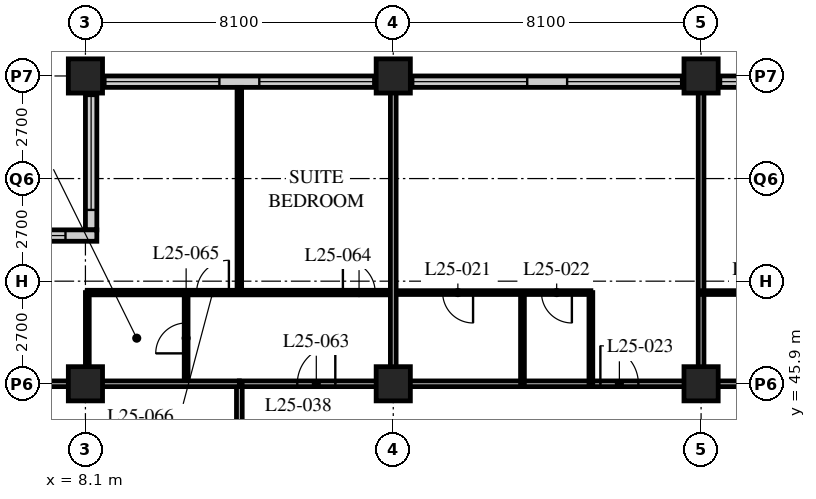
"""IFC4 building model, lengths in metres.
Left out: names, types, materials, properties, quantities, classifications, styles, units other than length and angle.
Written with IfcOpenShell. Run it as: python <this file> out.ifc"""

import sys

from ifc_helpers import new_model, si_unit, direction, frame, frame_2d, origin, origin_2d, place, context, subcontext, project, spatial, rectangle, hollow_rectangle, extrude, element, fill, save


model = new_model("IFC4")
c1 = context("Model", 3, precision=1e-05, world=origin(), true_north=direction((0.0, 1.0)))
c2 = subcontext(c1, "Body", "Model", "MODEL_VIEW")
j1 = project(units=[si_unit("LENGTHUNIT", "METRE"), si_unit("PLANEANGLEUNIT", "RADIAN")], contexts=[c1])
p1 = place(None, origin())
s1 = spatial("IfcSite", under=j1, at=p1, CompositionType="ELEMENT")
p2 = place(p1, origin())
s2 = spatial("IfcBuilding", under=s1, at=p2, CompositionType="ELEMENT")
p3 = place(p2, frame((0.0, 0.0, 103.4)))
s3 = spatial("IfcBuildingStorey", under=s2, at=p3, CompositionType="ELEMENT", Elevation=103.4)
p4 = place(p3, frame((8.1, 45.9, 0.0), z_axis=(0.0, 0.0, 1.0), x_axis=(1.0, 0.0, 0.0)))
e1 = element("IfcColumn", 1, at=p4, inside=s3, PredefinedType="COLUMN", context=c2, shape_type="SweptSolid", body=[
    extrude(hollow_rectangle(XDim=0.9, YDim=0.9, WallThickness=0.1, at=origin_2d()), origin(), (0.0, 0.0, 1.0), 3.4),
])
p5 = place(p3, frame((8.1, 54.0, 0.0), z_axis=(0.0, 0.0, 1.0), x_axis=(1.0, 0.0, 0.0)))
e2 = element("IfcColumn", 2, at=p5, inside=s3, PredefinedType="COLUMN", context=c2, shape_type="SweptSolid", body=[
    extrude(hollow_rectangle(XDim=0.9, YDim=0.9, WallThickness=0.09, at=origin_2d()), origin(), (0.0, 0.0, 1.0), 3.4),
])
p6 = place(p3, frame((16.2, 45.9, 0.0), z_axis=(0.0, 0.0, 1.0), x_axis=(1.0, 0.0, 0.0)))
e3 = element("IfcColumn", 3, at=p6, inside=s3, PredefinedType="COLUMN", context=c2, shape_type="SweptSolid", body=[
    extrude(hollow_rectangle(XDim=0.9, YDim=0.9, WallThickness=0.1, at=origin_2d()), origin(), (0.0, 0.0, 1.0), 3.4),
])
p7 = place(p3, frame((16.2, 54.0, 0.0), z_axis=(0.0, 0.0, 1.0), x_axis=(1.0, 0.0, 0.0)))
e4 = element("IfcColumn", 4, at=p7, inside=s3, PredefinedType="COLUMN", context=c2, shape_type="SweptSolid", body=[
    extrude(hollow_rectangle(XDim=0.9, YDim=0.9, WallThickness=0.09, at=origin_2d()), origin(), (0.0, 0.0, 1.0), 3.4),
])
p8 = place(p3, frame((24.3, 45.9, 0.0), z_axis=(0.0, 0.0, 1.0), x_axis=(1.0, 0.0, 0.0)))
e5 = element("IfcColumn", 5, at=p8, inside=s3, PredefinedType="COLUMN", context=c2, shape_type="SweptSolid", body=[
    extrude(hollow_rectangle(XDim=0.9, YDim=0.9, WallThickness=0.1, at=origin_2d()), origin(), (0.0, 0.0, 1.0), 3.4),
])
p9 = place(p3, frame((24.3, 54.0, 0.0), z_axis=(0.0, 0.0, 1.0), x_axis=(1.0, 0.0, 0.0)))
e6 = element("IfcColumn", 6, at=p9, inside=s3, PredefinedType="COLUMN", context=c2, shape_type="SweptSolid", body=[
    extrude(hollow_rectangle(XDim=0.9, YDim=0.9, WallThickness=0.09, at=origin_2d()), origin(), (0.0, 0.0, 1.0), 3.4),
])
p10 = place(p3, frame((48.3, 53.85, 0.0), z_axis=(0.0, 0.0, 1.0), x_axis=(-1.0, 0.0, 0.0)))
e7 = element("IfcWall", 7, at=p10, inside=s3, PredefinedType="SOLIDWALL", context=c2, shape_type="SweptSolid", body=[
    extrude(rectangle(XDim=40.2, YDim=0.3, at=frame_2d((20.1, 0.0))), origin(), (0.0, 0.0, 1.0), 3.19),
])
p11 = place(p10, frame((0.225, 0.0, 0.9)))
e8 = element("IfcOpeningElement", 8, at=p11, cuts=e7, PredefinedType="OPENING", context=c2, shape_type="SweptSolid", body=[
    extrude(rectangle(XDim=3.0, YDim=2.0, at=frame_2d((1.5, 1.0))), frame((0.0, 0.16, 0.0), z_axis=(0.0, -1.0, 0.0), x_axis=(1.0, 0.0, 0.0)), (0.0, 0.0, 1.0), 0.32),
])
p12 = place(p10, frame((4.275, 0.0, 0.9)))
e9 = element("IfcOpeningElement", 9, at=p12, cuts=e7, PredefinedType="OPENING", context=c2, shape_type="SweptSolid", body=[
    extrude(rectangle(XDim=3.0, YDim=2.0, at=frame_2d((1.5, 1.0))), frame((0.0, 0.16, 0.0), z_axis=(0.0, -1.0, 0.0), x_axis=(1.0, 0.0, 0.0)), (0.0, 0.0, 1.0), 0.32),
])
p13 = place(p10, frame((8.325, 0.0, 0.9)))
e10 = element("IfcOpeningElement", 10, at=p13, cuts=e7, PredefinedType="OPENING", context=c2, shape_type="SweptSolid", body=[
    extrude(rectangle(XDim=3.0, YDim=2.0, at=frame_2d((1.5, 1.0))), frame((0.0, 0.16, 0.0), z_axis=(0.0, -1.0, 0.0), x_axis=(1.0, 0.0, 0.0)), (0.0, 0.0, 1.0), 0.32),
])
p14 = place(p10, frame((12.375, 0.0, 0.9)))
e11 = element("IfcOpeningElement", 11, at=p14, cuts=e7, PredefinedType="OPENING", context=c2, shape_type="SweptSolid", body=[
    extrude(rectangle(XDim=3.0, YDim=2.0, at=frame_2d((1.5, 1.0))), frame((0.0, 0.16, 0.0), z_axis=(0.0, -1.0, 0.0), x_axis=(1.0, 0.0, 0.0)), (0.0, 0.0, 1.0), 0.32),
])
p15 = place(p10, frame((16.425, 0.0, 0.9)))
e12 = element("IfcOpeningElement", 12, at=p15, cuts=e7, PredefinedType="OPENING", context=c2, shape_type="SweptSolid", body=[
    extrude(rectangle(XDim=3.0, YDim=2.0, at=frame_2d((1.5, 1.0))), frame((0.0, 0.16, 0.0), z_axis=(0.0, -1.0, 0.0), x_axis=(1.0, 0.0, 0.0)), (0.0, 0.0, 1.0), 0.32),
])
p16 = place(p10, frame((20.475, 0.0, 0.9)))
e13 = element("IfcOpeningElement", 13, at=p16, cuts=e7, PredefinedType="OPENING", context=c2, shape_type="SweptSolid", body=[
    extrude(rectangle(XDim=3.0, YDim=2.0, at=frame_2d((1.5, 1.0))), frame((0.0, 0.16, 0.0), z_axis=(0.0, -1.0, 0.0), x_axis=(1.0, 0.0, 0.0)), (0.0, 0.0, 1.0), 0.32),
])
p17 = place(p10, frame((24.525, 0.0, 0.9)))
e14 = element("IfcOpeningElement", 14, at=p17, cuts=e7, PredefinedType="OPENING", context=c2, shape_type="SweptSolid", body=[
    extrude(rectangle(XDim=3.0, YDim=2.0, at=frame_2d((1.5, 1.0))), frame((0.0, 0.16, 0.0), z_axis=(0.0, -1.0, 0.0), x_axis=(1.0, 0.0, 0.0)), (0.0, 0.0, 1.0), 0.32),
])
p18 = place(p10, frame((28.575, 0.0, 0.9)))
e15 = element("IfcOpeningElement", 15, at=p18, cuts=e7, PredefinedType="OPENING", context=c2, shape_type="SweptSolid", body=[
    extrude(rectangle(XDim=3.0, YDim=2.0, at=frame_2d((1.5, 1.0))), frame((0.0, 0.16, 0.0), z_axis=(0.0, -1.0, 0.0), x_axis=(1.0, 0.0, 0.0)), (0.0, 0.0, 1.0), 0.32),
])
p19 = place(p10, frame((32.625, 0.0, 0.9)))
e16 = element("IfcOpeningElement", 16, at=p19, cuts=e7, PredefinedType="OPENING", context=c2, shape_type="SweptSolid", body=[
    extrude(rectangle(XDim=3.0, YDim=2.0, at=frame_2d((1.5, 1.0))), frame((0.0, 0.16, 0.0), z_axis=(0.0, -1.0, 0.0), x_axis=(1.0, 0.0, 0.0)), (0.0, 0.0, 1.0), 0.32),
])
p20 = place(p10, frame((36.675, 0.0, 0.9)))
e17 = element("IfcOpeningElement", 17, at=p20, cuts=e7, PredefinedType="OPENING", context=c2, shape_type="SweptSolid", body=[
    extrude(rectangle(XDim=3.0, YDim=2.0, at=frame_2d((1.5, 1.0))), frame((0.0, 0.16, 0.0), z_axis=(0.0, -1.0, 0.0), x_axis=(1.0, 0.0, 0.0)), (0.0, 0.0, 1.0), 0.32),
])
p21 = place(p3, frame((8.25, 53.7, 0.0), z_axis=(0.0, 0.0, 1.0), x_axis=(0.0, -1.0, 0.0)))
e18 = element("IfcWall", 18, at=p21, inside=s3, PredefinedType="SOLIDWALL", context=c2, shape_type="SweptSolid", body=[
    extrude(rectangle(XDim=3.75, YDim=0.3, at=frame_2d((1.875, 0.0))), origin(), (0.0, 0.0, 1.0), 2.64),
])
p22 = place(p21, frame((0.225, 0.0, 0.9)))
e19 = element("IfcOpeningElement", 19, at=p22, cuts=e18, PredefinedType="OPENING", context=c2, shape_type="SweptSolid", body=[
    extrude(rectangle(XDim=3.0, YDim=1.5, at=frame_2d((1.5, 0.75))), frame((0.0, 0.16, 0.0), z_axis=(0.0, -1.0, 0.0), x_axis=(1.0, 0.0, 0.0)), (0.0, 0.0, 1.0), 0.32),
])
p23 = place(p3, frame((8.4, 49.8, 0.0), z_axis=(0.0, 0.0, 1.0), x_axis=(-1.0, 0.0, 0.0)))
e20 = element("IfcWall", 20, at=p23, inside=s3, PredefinedType="SOLIDWALL", context=c2, shape_type="SweptSolid", body=[
    extrude(rectangle(XDim=4.35, YDim=0.3, at=frame_2d((2.175, 0.0))), origin(), (0.0, 0.0, 1.0), 3.19),
])
p24 = place(p23, frame((0.825, 0.0, 0.9)))
e21 = element("IfcOpeningElement", 21, at=p24, cuts=e20, PredefinedType="OPENING", context=c2, shape_type="SweptSolid", body=[
    extrude(rectangle(XDim=3.0, YDim=1.5, at=frame_2d((1.5, 0.75))), frame((0.0, 0.16, 0.0), z_axis=(0.0, -1.0, 0.0), x_axis=(1.0, 0.0, 0.0)), (0.0, 0.0, 1.0), 0.32),
])
p25 = place(p3, frame((12.15, 45.9, 0.0), z_axis=(0.0, 0.0, 1.0), x_axis=(1.0, 0.0, 0.0)))
e22 = element("IfcWall", 22, at=p25, inside=s3, PredefinedType="PARTITIONING", context=c2, shape_type="SweptSolid", body=[
    extrude(rectangle(XDim=32.4, YDim=0.15, at=frame_2d((16.2, 0.0))), origin(), (0.0, 0.0, 1.0), 2.578),
])
p26 = place(p25, frame((9.5, 0.0, 0.0)))
e23 = element("IfcOpeningElement", 23, at=p26, cuts=e22, PredefinedType="OPENING", context=c2, shape_type="SweptSolid", body=[
    extrude(rectangle(XDim=1.0, YDim=2.1, at=frame_2d((0.5, 1.05))), frame((0.0, 0.085, 0.0), z_axis=(0.0, -1.0, 0.0), x_axis=(1.0, 0.0, 0.0)), (0.0, 0.0, 1.0), 0.17),
])
p27 = place(p25, frame((17.6, 0.0, 0.0)))
e24 = element("IfcOpeningElement", 24, at=p27, cuts=e22, PredefinedType="OPENING", context=c2, shape_type="SweptSolid", body=[
    extrude(rectangle(XDim=1.0, YDim=2.1, at=frame_2d((0.5, 1.05))), frame((0.0, 0.085, 0.0), z_axis=(0.0, -1.0, 0.0), x_axis=(1.0, 0.0, 0.0)), (0.0, 0.0, 1.0), 0.17),
])
p28 = place(p25, frame((25.7, 0.0, 0.0)))
e25 = element("IfcOpeningElement", 25, at=p28, cuts=e22, PredefinedType="OPENING", context=c2, shape_type="SweptSolid", body=[
    extrude(rectangle(XDim=1.0, YDim=2.1, at=frame_2d((0.5, 1.05))), frame((0.0, 0.085, 0.0), z_axis=(0.0, -1.0, 0.0), x_axis=(1.0, 0.0, 0.0)), (0.0, 0.0, 1.0), 0.17),
])
p29 = place(p25, frame((29.875, 0.0, 0.0)))
e26 = element("IfcOpeningElement", 26, at=p29, cuts=e22, PredefinedType="OPENING", context=c2, shape_type="SweptSolid", body=[
    extrude(rectangle(XDim=1.0, YDim=2.1, at=frame_2d((0.5, 1.05))), frame((0.0, 0.085, 0.0), z_axis=(0.0, -1.0, 0.0), x_axis=(1.0, 0.0, 0.0)), (0.0, 0.0, 1.0), 0.17),
])
p30 = place(p25, frame((1.525, 0.0, 0.0)))
e27 = element("IfcOpeningElement", 27, at=p30, cuts=e22, PredefinedType="OPENING", context=c2, shape_type="SweptSolid", body=[
    extrude(rectangle(XDim=1.0, YDim=2.1, at=frame_2d((0.5, 1.05))), frame((0.0, 0.085, 0.0), z_axis=(0.0, -1.0, 0.0), x_axis=(1.0, 0.0, 0.0)), (0.0, 0.0, 1.0), 0.17),
])
p31 = place(p3, frame((12.15, 21.6, 0.0), z_axis=(0.0, 0.0, 1.0), x_axis=(0.0, 1.0, 0.0)))
e28 = element("IfcWall", 28, at=p31, inside=s3, PredefinedType="PARTITIONING", context=c2, shape_type="SweptSolid", body=[
    extrude(rectangle(XDim=24.3, YDim=0.15, at=frame_2d((12.15, 0.0))), origin(), (0.0, 0.0, 1.0), 3.19),
])
p32 = place(p31, frame((5.45, 0.0, 0.0)))
e29 = element("IfcOpeningElement", 29, at=p32, cuts=e28, PredefinedType="OPENING", context=c2, shape_type="SweptSolid", body=[
    extrude(rectangle(XDim=1.0, YDim=2.1, at=frame_2d((0.5, 1.05))), frame((0.0, 0.085, 0.0), z_axis=(0.0, -1.0, 0.0), x_axis=(1.0, 0.0, 0.0)), (0.0, 0.0, 1.0), 0.17),
])
p33 = place(p31, frame((13.55, 0.0, 0.0)))
e30 = element("IfcOpeningElement", 30, at=p33, cuts=e28, PredefinedType="OPENING", context=c2, shape_type="SweptSolid", body=[
    extrude(rectangle(XDim=1.0, YDim=2.1, at=frame_2d((0.5, 1.05))), frame((0.0, 0.085, 0.0), z_axis=(0.0, -1.0, 0.0), x_axis=(1.0, 0.0, 0.0)), (0.0, 0.0, 1.0), 0.17),
])
p34 = place(p31, frame((21.65, 0.0, 0.0)))
e31 = element("IfcOpeningElement", 31, at=p34, cuts=e28, PredefinedType="OPENING", context=c2, shape_type="SweptSolid", body=[
    extrude(rectangle(XDim=1.0, YDim=2.1, at=frame_2d((0.5, 1.05))), frame((0.0, 0.085, 0.0), z_axis=(0.0, -1.0, 0.0), x_axis=(1.0, 0.0, 0.0)), (0.0, 0.0, 1.0), 0.17),
])
p35 = place(p3, frame((16.2, 48.3, 0.0), z_axis=(0.0, 0.0, 1.0), x_axis=(1.0, 0.0, 0.0)))
e32 = element("IfcWall", 32, at=p35, inside=s3, PredefinedType="PARTITIONING", context=c2, shape_type="SweptSolid", body=[
    extrude(rectangle(XDim=5.2, YDim=0.1, at=frame_2d((2.6, 0.0))), origin(), (0.0, 0.0, 1.0), 3.19),
])
p36 = place(p35, frame((1.3, 0.0, 0.0)))
e33 = element("IfcOpeningElement", 33, at=p36, cuts=e32, PredefinedType="OPENING", context=c2, shape_type="SweptSolid", body=[
    extrude(rectangle(XDim=0.8, YDim=2.1, at=frame_2d((0.4, 1.05))), frame((0.0, 0.06, 0.0), z_axis=(0.0, -1.0, 0.0), x_axis=(1.0, 0.0, 0.0)), (0.0, 0.0, 1.0), 0.12),
])
p37 = place(p35, frame((3.9, 0.0, 0.0)))
e34 = element("IfcOpeningElement", 34, at=p37, cuts=e32, PredefinedType="OPENING", context=c2, shape_type="SweptSolid", body=[
    extrude(rectangle(XDim=0.8, YDim=2.1, at=frame_2d((0.4, 1.05))), frame((0.0, 0.06, 0.0), z_axis=(0.0, -1.0, 0.0), x_axis=(1.0, 0.0, 0.0)), (0.0, 0.0, 1.0), 0.12),
])
for number, where, z_axis, x_axis in (
    (35, (19.6, 45.9, 0.0), (0.0, 0.0, 1.0), (0.0, 1.0, 0.0)),
    (36, (21.4, 45.9, 0.0), (0.0, 0.0, 1.0), (0.0, 1.0, 0.0)),
):
    element("IfcWall", number, at=place(p3, frame(where, z_axis=z_axis, x_axis=x_axis)), inside=s3, PredefinedType="PARTITIONING", context=c2, shape_type="SweptSolid", body=[
        extrude(rectangle(XDim=2.4, YDim=0.1, at=frame_2d((1.2, 0.0))), origin(), (0.0, 0.0, 1.0), 3.19),
    ])
p38 = place(p3, frame((24.3, 45.9, 0.0), z_axis=(0.0, 0.0, 1.0), x_axis=(0.0, 1.0, 0.0)))
e37 = element("IfcWall", 37, at=p38, inside=s3, PredefinedType="PARTITIONING", context=c2, shape_type="SweptSolid", body=[
    extrude(rectangle(XDim=7.8, YDim=0.15, at=frame_2d((3.9, 0.0))), origin(), (0.0, 0.0, 1.0), 2.64),
])
p39 = place(p3, frame((24.3, 48.3, 0.0), z_axis=(0.0, 0.0, 1.0), x_axis=(1.0, 0.0, 0.0)))
e38 = element("IfcWall", 38, at=p39, inside=s3, PredefinedType="PARTITIONING", context=c2, shape_type="SweptSolid", body=[
    extrude(rectangle(XDim=5.2, YDim=0.1, at=frame_2d((2.6, 0.0))), origin(), (0.0, 0.0, 1.0), 3.19),
])
p40 = place(p39, frame((1.3, 0.0, 0.0)))
e39 = element("IfcOpeningElement", 39, at=p40, cuts=e38, PredefinedType="OPENING", context=c2, shape_type="SweptSolid", body=[
    extrude(rectangle(XDim=0.8, YDim=2.1, at=frame_2d((0.4, 1.05))), frame((0.0, 0.06, 0.0), z_axis=(0.0, -1.0, 0.0), x_axis=(1.0, 0.0, 0.0)), (0.0, 0.0, 1.0), 0.12),
])
p41 = place(p39, frame((3.9, 0.0, 0.0)))
e40 = element("IfcOpeningElement", 40, at=p41, cuts=e38, PredefinedType="OPENING", context=c2, shape_type="SweptSolid", body=[
    extrude(rectangle(XDim=0.8, YDim=2.1, at=frame_2d((0.4, 1.05))), frame((0.0, 0.06, 0.0), z_axis=(0.0, -1.0, 0.0), x_axis=(1.0, 0.0, 0.0)), (0.0, 0.0, 1.0), 0.12),
])
p42 = place(p3, frame((10.75, 45.9, 0.0), z_axis=(0.0, 0.0, 1.0), x_axis=(0.0, 1.0, 0.0)))
e41 = element("IfcWall", 41, at=p42, inside=s3, PredefinedType="PARTITIONING", context=c2, shape_type="SweptSolid", body=[
    extrude(rectangle(XDim=2.4, YDim=0.1, at=frame_2d((1.2, 0.0))), origin(), (0.0, 0.0, 1.0), 3.19),
])
p43 = place(p42, frame((0.8, 0.0, 0.0)))
e42 = element("IfcOpeningElement", 42, at=p43, cuts=e41, PredefinedType="OPENING", context=c2, shape_type="SweptSolid", body=[
    extrude(rectangle(XDim=0.8, YDim=2.1, at=frame_2d((0.4, 1.05))), frame((0.0, 0.06, 0.0), z_axis=(0.0, -1.0, 0.0), x_axis=(1.0, 0.0, 0.0)), (0.0, 0.0, 1.0), 0.12),
])
p44 = place(p3, frame((8.15, 45.9, 0.0), z_axis=(0.0, 0.0, 1.0), x_axis=(0.0, 1.0, 0.0)))
e43 = element("IfcWall", 43, at=p44, inside=s3, PredefinedType="PARTITIONING", context=c2, shape_type="SweptSolid", body=[
    extrude(rectangle(XDim=2.4, YDim=0.1, at=frame_2d((1.2, 0.0))), origin(), (0.0, 0.0, 1.0), 2.64),
])
p45 = place(p3, frame((8.15, 48.3, 0.0), z_axis=(0.0, 0.0, 1.0), x_axis=(1.0, 0.0, 0.0)))
e44 = element("IfcWall", 44, at=p45, inside=s3, PredefinedType="PARTITIONING", context=c2, shape_type="SweptSolid", body=[
    extrude(rectangle(XDim=8.05, YDim=0.12, at=frame_2d((4.025, 0.0))), origin(), (0.0, 0.0, 1.0), 3.19),
])
p46 = place(p45, frame((6.725, 0.0, 0.0)))
e45 = element("IfcOpeningElement", 45, at=p46, cuts=e44, PredefinedType="OPENING", context=c2, shape_type="SweptSolid", body=[
    extrude(rectangle(XDim=0.85, YDim=2.1, at=frame_2d((0.425, 1.05))), frame((0.0, 0.07, 0.0), z_axis=(0.0, -1.0, 0.0), x_axis=(1.0, 0.0, 0.0)), (0.0, 0.0, 1.0), 0.14),
])
p47 = place(p45, frame((2.875, 0.0, 0.0)))
e46 = element("IfcOpeningElement", 46, at=p47, cuts=e44, PredefinedType="OPENING", context=c2, shape_type="SweptSolid", body=[
    extrude(rectangle(XDim=0.85, YDim=2.1, at=frame_2d((0.425, 1.05))), frame((0.0, 0.07, 0.0), z_axis=(0.0, -1.0, 0.0), x_axis=(1.0, 0.0, 0.0)), (0.0, 0.0, 1.0), 0.14),
])
p48 = place(p3, frame((12.15, 48.3, 0.0), z_axis=(0.0, 0.0, 1.0), x_axis=(0.0, 1.0, 0.0)))
e47 = element("IfcWall", 47, at=p48, inside=s3, PredefinedType="PARTITIONING", context=c2, shape_type="SweptSolid", body=[
    extrude(rectangle(XDim=5.4, YDim=0.12, at=frame_2d((2.7, 0.0))), origin(), (0.0, 0.0, 1.0), 3.19),
])
p49 = place(p3, frame((4.35, 45.9, 0.0), z_axis=(0.0, 0.0, 1.0), x_axis=(1.0, 0.0, 0.0)))
e48 = element("IfcWall", 48, at=p49, inside=s3, PredefinedType="PARTITIONING", context=c2, shape_type="SweptSolid", body=[
    extrude(rectangle(XDim=7.8, YDim=0.15, at=frame_2d((3.9, 0.0))), origin(), (0.0, 0.0, 1.0), 2.578),
])
p50 = place(p3, frame((16.2, 45.9, 0.0), z_axis=(0.0, 0.0, 1.0), x_axis=(0.0, 1.0, 0.0)))
e49 = element("IfcWall", 49, at=p50, inside=s3, PredefinedType="PARTITIONING", context=c2, shape_type="SweptSolid", body=[
    extrude(rectangle(XDim=7.8, YDim=0.15, at=frame_2d((3.9, 0.0))), origin(), (0.0, 0.0, 1.0), 2.64),
])
p51 = place(p16, origin())
e50 = element("IfcWindow", 50, at=p51, inside=s3, PartitioningType="SINGLE_PANEL", PredefinedType="WINDOW", context=c2, shape_type="SweptSolid", body=[
    extrude(rectangle(XDim=3.0, YDim=2.0, at=frame_2d((1.5, 1.0))), frame((0.0, 0.03, 0.0), z_axis=(0.0, -1.0, 0.0), x_axis=(1.0, 0.0, 0.0)), (0.0, 0.0, 1.0), 0.06),
])
fill(e13, e50)
p52 = place(p17, origin())
e51 = element("IfcWindow", 51, at=p52, inside=s3, PartitioningType="SINGLE_PANEL", PredefinedType="WINDOW", context=c2, shape_type="SweptSolid", body=[
    extrude(rectangle(XDim=3.0, YDim=2.0, at=frame_2d((1.5, 1.0))), frame((0.0, 0.03, 0.0), z_axis=(0.0, -1.0, 0.0), x_axis=(1.0, 0.0, 0.0)), (0.0, 0.0, 1.0), 0.06),
])
fill(e14, e51)
p53 = place(p18, origin())
e52 = element("IfcWindow", 52, at=p53, inside=s3, PartitioningType="SINGLE_PANEL", PredefinedType="WINDOW", context=c2, shape_type="SweptSolid", body=[
    extrude(rectangle(XDim=3.0, YDim=2.0, at=frame_2d((1.5, 1.0))), frame((0.0, 0.03, 0.0), z_axis=(0.0, -1.0, 0.0), x_axis=(1.0, 0.0, 0.0)), (0.0, 0.0, 1.0), 0.06),
])
fill(e15, e52)
p54 = place(p19, origin())
e53 = element("IfcWindow", 53, at=p54, inside=s3, PartitioningType="SINGLE_PANEL", PredefinedType="WINDOW", context=c2, shape_type="SweptSolid", body=[
    extrude(rectangle(XDim=3.0, YDim=2.0, at=frame_2d((1.5, 1.0))), frame((0.0, 0.03, 0.0), z_axis=(0.0, -1.0, 0.0), x_axis=(1.0, 0.0, 0.0)), (0.0, 0.0, 1.0), 0.06),
])
fill(e16, e53)
p55 = place(p20, origin())
e54 = element("IfcWindow", 54, at=p55, inside=s3, PartitioningType="SINGLE_PANEL", PredefinedType="WINDOW", context=c2, shape_type="SweptSolid", body=[
    extrude(rectangle(XDim=3.0, YDim=2.0, at=frame_2d((1.5, 1.0))), frame((0.0, 0.03, 0.0), z_axis=(0.0, -1.0, 0.0), x_axis=(1.0, 0.0, 0.0)), (0.0, 0.0, 1.0), 0.06),
])
fill(e17, e54)
p56 = place(p22, origin())
e55 = element("IfcWindow", 55, at=p56, inside=s3, PartitioningType="SINGLE_PANEL", PredefinedType="WINDOW", context=c2, shape_type="SweptSolid", body=[
    extrude(rectangle(XDim=3.0, YDim=1.5, at=frame_2d((1.5, 0.75))), frame((0.0, 0.03, 0.0), z_axis=(0.0, -1.0, 0.0), x_axis=(1.0, 0.0, 0.0)), (0.0, 0.0, 1.0), 0.06),
])
fill(e19, e55)
p57 = place(p24, origin())
e56 = element("IfcWindow", 56, at=p57, inside=s3, PartitioningType="SINGLE_PANEL", PredefinedType="WINDOW", context=c2, shape_type="SweptSolid", body=[
    extrude(rectangle(XDim=3.0, YDim=1.5, at=frame_2d((1.5, 0.75))), frame((0.0, 0.03, 0.0), z_axis=(0.0, -1.0, 0.0), x_axis=(1.0, 0.0, 0.0)), (0.0, 0.0, 1.0), 0.06),
])
fill(e21, e56)
p58 = place(p36, origin())
e57 = element("IfcDoor", 57, at=p58, inside=s3, OperationType="SINGLE_SWING_LEFT", PredefinedType="DOOR", context=c2, shape_type="SweptSolid", body=[
    extrude(rectangle(XDim=0.8, YDim=2.1, at=frame_2d((0.4, 1.05))), frame((0.0, 0.025, 0.0), z_axis=(0.0, -1.0, 0.0), x_axis=(1.0, 0.0, 0.0)), (0.0, 0.0, 1.0), 0.05),
])
fill(e33, e57)
p59 = place(p37, origin())
e58 = element("IfcDoor", 58, at=p59, inside=s3, OperationType="SINGLE_SWING_LEFT", PredefinedType="DOOR", context=c2, shape_type="SweptSolid", body=[
    extrude(rectangle(XDim=0.8, YDim=2.1, at=frame_2d((0.4, 1.05))), frame((0.0, 0.025, 0.0), z_axis=(0.0, -1.0, 0.0), x_axis=(1.0, 0.0, 0.0)), (0.0, 0.0, 1.0), 0.05),
])
fill(e34, e58)
p60 = place(p26, origin())
e59 = element("IfcDoor", 59, at=p60, inside=s3, OperationType="SINGLE_SWING_LEFT", PredefinedType="DOOR", context=c2, shape_type="SweptSolid", body=[
    extrude(rectangle(XDim=1.0, YDim=2.1, at=frame_2d((0.5, 1.05))), frame((0.0, 0.025, 0.0), z_axis=(0.0, -1.0, 0.0), x_axis=(1.0, 0.0, 0.0)), (0.0, 0.0, 1.0), 0.05),
])
fill(e23, e59)
p61 = place(p30, origin())
e60 = element("IfcDoor", 60, at=p61, inside=s3, OperationType="SINGLE_SWING_RIGHT", PredefinedType="DOOR", context=c2, shape_type="SweptSolid", body=[
    extrude(rectangle(XDim=1.0, YDim=2.1, at=frame_2d((0.5, 1.05))), frame((0.0, 0.025, 0.0), z_axis=(0.0, -1.0, 0.0), x_axis=(1.0, 0.0, 0.0)), (0.0, 0.0, 1.0), 0.05),
])
fill(e27, e60)
p62 = place(p46, origin())
e61 = element("IfcDoor", 61, at=p62, inside=s3, OperationType="SINGLE_SWING_LEFT", PredefinedType="DOOR", context=c2, shape_type="SweptSolid", body=[
    extrude(rectangle(XDim=0.85, YDim=2.1, at=frame_2d((0.425, 1.05))), frame((0.0, 0.025, 0.0), z_axis=(0.0, -1.0, 0.0), x_axis=(1.0, 0.0, 0.0)), (0.0, 0.0, 1.0), 0.05),
])
fill(e45, e61)
p63 = place(p43, origin())
e62 = element("IfcDoor", 62, at=p63, inside=s3, OperationType="SINGLE_SWING_LEFT", PredefinedType="DOOR", context=c2, shape_type="SweptSolid", body=[
    extrude(rectangle(XDim=0.8, YDim=2.1, at=frame_2d((0.4, 1.05))), frame((0.0, 0.025, 0.0), z_axis=(0.0, -1.0, 0.0), x_axis=(1.0, 0.0, 0.0)), (0.0, 0.0, 1.0), 0.05),
])
fill(e42, e62)
p64 = place(p47, origin())
e63 = element("IfcDoor", 63, at=p64, inside=s3, OperationType="SINGLE_SWING_RIGHT", PredefinedType="DOOR", context=c2, shape_type="SweptSolid", body=[
    extrude(rectangle(XDim=0.85, YDim=2.1, at=frame_2d((0.425, 1.05))), frame((0.0, 0.025, 0.0), z_axis=(0.0, -1.0, 0.0), x_axis=(1.0, 0.0, 0.0)), (0.0, 0.0, 1.0), 0.05),
])
fill(e46, e63)
save(model, sys.argv[1])
